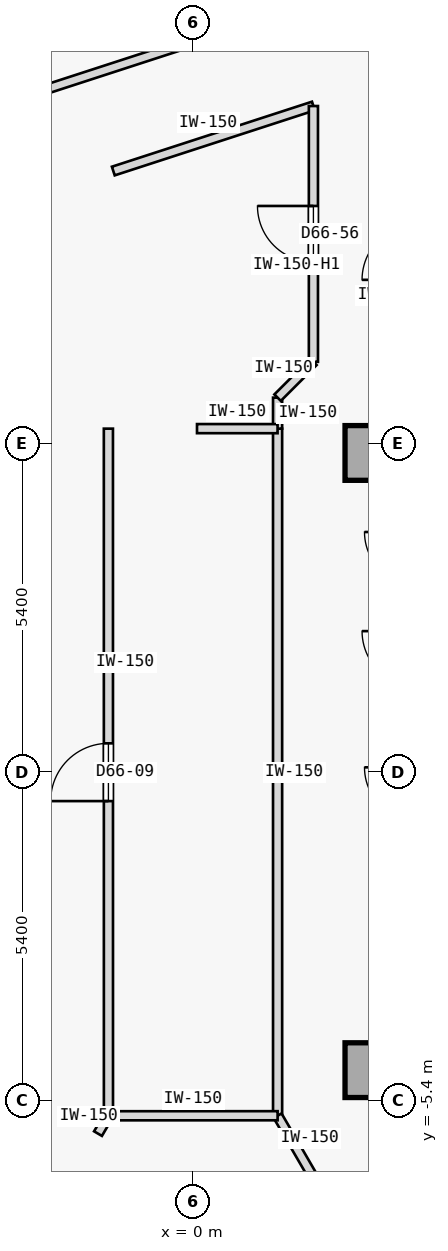
"""IFC4 building model, lengths in metres.
Left out: names, types, materials, properties, quantities, classifications, styles, units other than length and angle.
Written with IfcOpenShell. Run it as: python <this file> out.ifc"""

import sys

from ifc_helpers import new_model, si_unit, direction, frame, frame_2d, origin, origin_2d, place, context, subcontext, project, spatial, rectangle, extrude, element, fill, save


model = new_model("IFC4")
c1 = context("Model", 3, precision=1e-05, world=origin(), true_north=direction((0.0, 1.0)))
c2 = subcontext(c1, "Body", "Model", "MODEL_VIEW")
j1 = project(units=[si_unit("LENGTHUNIT", "METRE"), si_unit("PLANEANGLEUNIT", "RADIAN")], contexts=[c1])
p1 = place(None, origin())
s1 = spatial("IfcSite", under=j1, at=p1, CompositionType="ELEMENT")
p2 = place(p1, origin())
s2 = spatial("IfcBuilding", under=s1, at=p2, CompositionType="ELEMENT")
p3 = place(p2, frame((0.0, 0.0, 247.75)))
s3 = spatial("IfcBuildingStorey", under=s2, at=p3, CompositionType="ELEMENT", Elevation=247.75)
for number, where, z_axis, x_axis in (
    (1, (2.95, -4.9, 0.0), (0.0, 0.0, 1.0), (1.0, 0.0, 0.0)),
    (2, (2.95, 5.25, 0.0), (0.0, 0.0, 1.0), (1.0, 0.0, 0.0)),
):
    element("IfcColumn", number, at=place(p3, frame(where, z_axis=z_axis, x_axis=x_axis)), inside=s3, PredefinedType="COLUMN", context=c2, shape_type="SweptSolid", body=[
        extrude(rectangle(XDim=0.9, YDim=0.9, at=origin_2d()), origin(), (0.0, 0.0, 1.0), 3.35),
    ])
p4 = place(p3, frame((-1.391, -5.65, 0.0), z_axis=(0.0, 0.0, 1.0), x_axis=(-8.6422954e-05, 0.999999996266, 0.0)))
e3 = element("IfcWall", 3, at=p4, inside=s3, PredefinedType="PARTITIONING", context=c2, shape_type="SweptSolid", body=[
    extrude(rectangle(XDim=11.3, YDim=0.15, at=frame_2d((5.65, 0.0))), origin(), (0.0, 0.0, 1.0), 3.125),
])
p5 = place(p4, frame((5.175, 0.0, 0.0)))
e4 = element("IfcOpeningElement", 4, at=p5, cuts=e3, PredefinedType="OPENING", context=c2, shape_type="SweptSolid", body=[
    extrude(rectangle(XDim=0.95, YDim=2.15, at=frame_2d((0.475, 1.075))), frame((0.0, 0.085, 0.0), z_axis=(0.0, -1.0, 0.0), x_axis=(1.0, 0.0, 0.0)), (0.0, 0.0, 1.0), 0.17),
])
p6 = place(p3, frame((1.391, -5.648, 0.0), z_axis=(0.0, 0.0, 1.0), x_axis=(-4.3218947e-05, 0.999999999066, 0.0)))
e5 = element("IfcWall", 5, at=p6, inside=s3, PredefinedType="PARTITIONING", context=c2, shape_type="SweptSolid", body=[
    extrude(rectangle(XDim=11.298, YDim=0.15, at=frame_2d((5.649, 0.0))), origin(), (0.0, 0.0, 1.0), 3.125),
])
p7 = place(p3, frame((-5.441, 10.247, 0.0), z_axis=(0.0, 0.0, 1.0), x_axis=(0.951062860421, 0.308997468483, 0.0)))
e6 = element("IfcWall", 6, at=p7, inside=s3, PredefinedType="PARTITIONING", context=c2, shape_type="SweptSolid", body=[
    extrude(rectangle(XDim=6.542, YDim=0.15, at=frame_2d((3.271, 0.0))), origin(), (0.0, 0.0, 1.0), 3.125),
])
p8 = place(p3, frame((-1.562, -5.944, 0.0), z_axis=(0.0, 0.0, 1.0), x_axis=(0.505387839696, 0.862892305845, 0.0)))
e7 = element("IfcWall", 7, at=p8, inside=s3, PredefinedType="PARTITIONING", context=c2, shape_type="SweptSolid", body=[
    extrude(rectangle(XDim=0.34, YDim=0.15, at=frame_2d((0.17, 0.0))), origin(), (0.0, 0.0, 1.0), 3.125),
])
p9 = place(p3, frame((1.391, -5.649, 0.0), z_axis=(0.0, 0.0, 1.0), x_axis=(0.502522642426, -0.864564048437, 0.0)))
e8 = element("IfcWall", 8, at=p9, inside=s3, PredefinedType="PARTITIONING", context=c2, shape_type="SweptSolid", body=[
    extrude(rectangle(XDim=1.171, YDim=0.15, at=frame_2d((0.586, 0.0))), origin(), (0.0, 0.0, 1.0), 3.125),
])
p10 = place(p3, frame((-1.311, 9.886, 0.0), z_axis=(0.0, 0.0, 1.0), x_axis=(0.951068803905, 0.308979174442, 0.0)))
e9 = element("IfcWall", 9, at=p10, inside=s3, PredefinedType="PARTITIONING", context=c2, shape_type="SweptSolid", body=[
    extrude(rectangle(XDim=3.46, YDim=0.15, at=frame_2d((1.73, 0.0))), origin(), (0.0, 0.0, 1.0), 3.125),
])
p11 = place(p3, frame((1.391, 5.649, 0.0), z_axis=(0.0, 0.0, 1.0), x_axis=(0.000957395444, 0.999999541697, 0.0)))
e10 = element("IfcWall", 10, at=p11, inside=s3, PredefinedType="PARTITIONING", context=c2, shape_type="SweptSolid", body=[
    extrude(rectangle(XDim=0.51, YDim=0.15, at=frame_2d((0.255, 0.0))), origin(), (0.0, 0.0, 1.0), 3.125),
])
p12 = place(p3, frame((1.391, 6.159, 0.0), z_axis=(0.0, 0.0, 1.0), x_axis=(0.707106781187, 0.707106781187, 0.0)))
e11 = element("IfcWall", 11, at=p12, inside=s3, PredefinedType="PARTITIONING", context=c2, shape_type="SweptSolid", body=[
    extrude(rectangle(XDim=0.833, YDim=0.15, at=frame_2d((0.417, 0.0))), origin(), (0.0, 0.0, 1.0), 3.125),
])
p13 = place(p3, frame((1.98, 6.748, 0.0), z_axis=(0.0, 0.0, 1.0), x_axis=(0.0, 1.0, 0.0)))
e12 = element("IfcWall", 12, at=p13, inside=s3, PredefinedType="PARTITIONING", context=c2, shape_type="SweptSolid", body=[
    extrude(rectangle(XDim=4.207, YDim=0.15, at=frame_2d((2.104, 0.0))), origin(), (0.0, 0.0, 1.0), 2.675),
])
p14 = place(p13, frame((1.643, 0.0, 0.0)))
e13 = element("IfcOpeningElement", 13, at=p14, cuts=e12, PredefinedType="OPENING", context=c2, shape_type="SweptSolid", body=[
    extrude(rectangle(XDim=0.92, YDim=2.15, at=frame_2d((0.46, 1.075))), frame((0.0, 0.085, 0.0), z_axis=(0.0, -1.0, 0.0), x_axis=(1.0, 0.0, 0.0)), (0.0, 0.0, 1.0), 0.17),
])
p15 = place(p3, frame((-1.391, -5.65, 0.0), z_axis=(0.0, 0.0, 1.0), x_axis=(0.999999965344, 0.000263273356, 0.0)))
e14 = element("IfcWall", 14, at=p15, inside=s3, PredefinedType="PARTITIONING", context=c2, shape_type="SweptSolid", body=[
    extrude(rectangle(XDim=2.782, YDim=0.15, at=frame_2d((1.391, 0.0))), origin(), (0.0, 0.0, 1.0), 3.125),
])
p16 = place(p3, frame((0.066, 5.65, 0.0), z_axis=(0.0, 0.0, 1.0), x_axis=(0.999999932094, -0.000368527707, 0.0)))
e15 = element("IfcWall", 15, at=p16, inside=s3, PredefinedType="PARTITIONING", context=c2, shape_type="SweptSolid", body=[
    extrude(rectangle(XDim=1.325, YDim=0.15, at=frame_2d((0.663, 0.0))), origin(), (0.0, 0.0, 1.0), 3.125),
])
p17 = place(p5, origin())
e16 = element("IfcDoor", 16, at=p17, inside=s3, OperationType="SINGLE_SWING_LEFT", PredefinedType="DOOR", context=c2, shape_type="SweptSolid", body=[
    extrude(rectangle(XDim=0.95, YDim=2.15, at=frame_2d((0.475, 1.075))), frame((0.0, 0.025, 0.0), z_axis=(0.0, -1.0, 0.0), x_axis=(1.0, 0.0, 0.0)), (0.0, 0.0, 1.0), 0.05),
])
fill(e4, e16)
p18 = place(p14, origin())
e17 = element("IfcDoor", 17, at=p18, inside=s3, OperationType="SINGLE_SWING_RIGHT", PredefinedType="DOOR", context=c2, shape_type="SweptSolid", body=[
    extrude(rectangle(XDim=0.92, YDim=2.15, at=frame_2d((0.46, 1.075))), frame((0.0, 0.025, 0.0), z_axis=(0.0, -1.0, 0.0), x_axis=(1.0, 0.0, 0.0)), (0.0, 0.0, 1.0), 0.05),
])
fill(e13, e17)
save(model, sys.argv[1])
